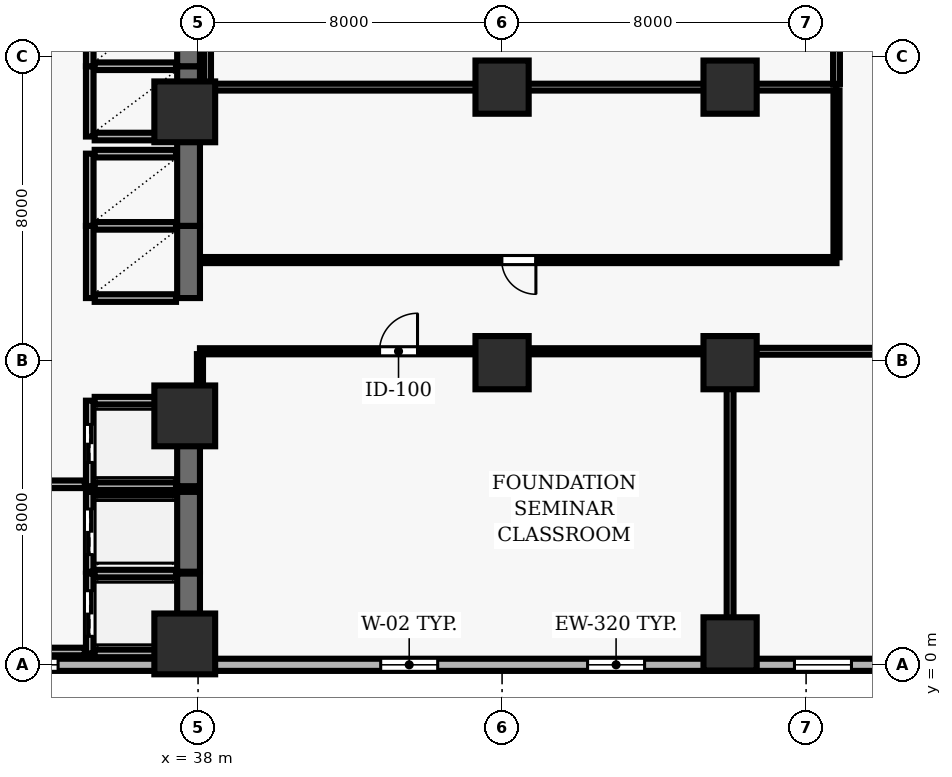
"""IFC4 building model, lengths in metres.
Left out: names, types, materials, properties, quantities, classifications, styles, units other than length and angle.
Written with IfcOpenShell. Run it as: python <this file> out.ifc"""

import sys

from ifc_helpers import new_model, si_unit, direction, frame, frame_2d, origin, origin_2d, place, context, subcontext, project, spatial, rectangle, extrude, element, fill, save


model = new_model("IFC4")
c1 = context("Model", 3, precision=1e-05, world=origin(), true_north=direction((0.0, 1.0)))
c2 = subcontext(c1, "Body", "Model", "MODEL_VIEW")
j1 = project(units=[si_unit("LENGTHUNIT", "METRE"), si_unit("PLANEANGLEUNIT", "RADIAN")], contexts=[c1])
p1 = place(None, origin())
s1 = spatial("IfcSite", under=j1, at=p1, CompositionType="ELEMENT")
p2 = place(p1, origin())
s2 = spatial("IfcBuilding", under=s1, at=p2, CompositionType="ELEMENT")
p3 = place(p2, frame((0.0, 0.0, 5.2)))
s3 = spatial("IfcBuildingStorey", under=s2, at=p3, CompositionType="ELEMENT", Elevation=5.2)
for number, where, z_axis, x_axis in (
    (1, (37.65, 0.55, 0.0), (0.0, 0.0, 1.0), (1.0, 0.0, 0.0)),
    (2, (37.65, 6.55, 0.0), (0.0, 0.0, 1.0), (1.0, 0.0, 0.0)),
    (3, (37.65, 14.55, 0.0), (0.0, 0.0, 1.0), (1.0, 0.0, 0.0)),
):
    element("IfcColumn", number, at=place(p3, frame(where, z_axis=z_axis, x_axis=x_axis)), inside=s3, PredefinedType="COLUMN", context=c2, shape_type="SweptSolid", body=[
        extrude(rectangle(XDim=1.6, YDim=1.6, at=origin_2d()), origin(), (0.0, 0.0, 1.0), 5.2),
    ])
for number, where, z_axis, x_axis in (
    (4, (46.0, 7.95, 0.0), (0.0, 0.0, 1.0), (1.0, 0.0, 0.0)),
    (5, (46.0, 15.2, 0.0), (0.0, 0.0, 1.0), (1.0, 0.0, 0.0)),
    (6, (52.0, 0.55, 0.0), (0.0, 0.0, 1.0), (1.0, 0.0, 0.0)),
    (7, (52.0, 7.95, 0.0), (0.0, 0.0, 1.0), (1.0, 0.0, 0.0)),
    (8, (52.0, 15.2, 0.0), (0.0, 0.0, 1.0), (1.0, 0.0, 0.0)),
):
    element("IfcColumn", number, at=place(p3, frame(where, z_axis=z_axis, x_axis=x_axis)), inside=s3, PredefinedType="COLUMN", context=c2, shape_type="SweptSolid", body=[
        extrude(rectangle(XDim=1.4, YDim=1.4, at=origin_2d()), origin(), (0.0, 0.0, 1.0), 5.2),
    ])
p4 = place(p3, frame((24.5, 0.0, 0.0), z_axis=(0.0, 0.0, 1.0), x_axis=(1.0, 0.0, 0.0)))
e9 = element("IfcWall", 9, at=p4, inside=s3, PredefinedType="SOLIDWALL", context=c2, shape_type="SweptSolid", body=[
    extrude(rectangle(XDim=49.0, YDim=0.32, at=frame_2d((24.5, 0.0))), origin(), (0.0, 0.0, 1.0), 4.92),
])
p5 = place(p4, frame((1.972, 0.0, 0.9)))
e10 = element("IfcOpeningElement", 10, at=p5, cuts=e9, PredefinedType="OPENING", context=c2, shape_type="SweptSolid", body=[
    extrude(rectangle(XDim=1.5, YDim=1.6, at=frame_2d((0.75, 0.8))), frame((0.0, 0.17, 0.0), z_axis=(0.0, -1.0, 0.0), x_axis=(1.0, 0.0, 0.0)), (0.0, 0.0, 1.0), 0.34),
])
p6 = place(p4, frame((8.317, 0.0, 0.9)))
e11 = element("IfcOpeningElement", 11, at=p6, cuts=e9, PredefinedType="OPENING", context=c2, shape_type="SweptSolid", body=[
    extrude(rectangle(XDim=1.5, YDim=1.6, at=frame_2d((0.75, 0.8))), frame((0.0, 0.17, 0.0), z_axis=(0.0, -1.0, 0.0), x_axis=(1.0, 0.0, 0.0)), (0.0, 0.0, 1.0), 0.34),
])
p7 = place(p4, frame((18.306, 0.0, 0.9)))
e12 = element("IfcOpeningElement", 12, at=p7, cuts=e9, PredefinedType="OPENING", context=c2, shape_type="SweptSolid", body=[
    extrude(rectangle(XDim=1.5, YDim=1.6, at=frame_2d((0.75, 0.8))), frame((0.0, 0.17, 0.0), z_axis=(0.0, -1.0, 0.0), x_axis=(1.0, 0.0, 0.0)), (0.0, 0.0, 1.0), 0.34),
])
p8 = place(p4, frame((23.75, 0.0, 0.9)))
e13 = element("IfcOpeningElement", 13, at=p8, cuts=e9, PredefinedType="OPENING", context=c2, shape_type="SweptSolid", body=[
    extrude(rectangle(XDim=1.5, YDim=1.6, at=frame_2d((0.75, 0.8))), frame((0.0, 0.17, 0.0), z_axis=(0.0, -1.0, 0.0), x_axis=(1.0, 0.0, 0.0)), (0.0, 0.0, 1.0), 0.34),
])
p9 = place(p4, frame((29.194, 0.0, 0.9)))
e14 = element("IfcOpeningElement", 14, at=p9, cuts=e9, PredefinedType="OPENING", context=c2, shape_type="SweptSolid", body=[
    extrude(rectangle(XDim=1.5, YDim=1.6, at=frame_2d((0.75, 0.8))), frame((0.0, 0.17, 0.0), z_axis=(0.0, -1.0, 0.0), x_axis=(1.0, 0.0, 0.0)), (0.0, 0.0, 1.0), 0.34),
])
p10 = place(p4, frame((34.639, 0.0, 0.9)))
e15 = element("IfcOpeningElement", 15, at=p10, cuts=e9, PredefinedType="OPENING", context=c2, shape_type="SweptSolid", body=[
    extrude(rectangle(XDim=1.5, YDim=1.6, at=frame_2d((0.75, 0.8))), frame((0.0, 0.17, 0.0), z_axis=(0.0, -1.0, 0.0), x_axis=(1.0, 0.0, 0.0)), (0.0, 0.0, 1.0), 0.34),
])
p11 = place(p4, frame((40.083, 0.0, 0.9)))
e16 = element("IfcOpeningElement", 16, at=p11, cuts=e9, PredefinedType="OPENING", context=c2, shape_type="SweptSolid", body=[
    extrude(rectangle(XDim=1.5, YDim=1.6, at=frame_2d((0.75, 0.8))), frame((0.0, 0.17, 0.0), z_axis=(0.0, -1.0, 0.0), x_axis=(1.0, 0.0, 0.0)), (0.0, 0.0, 1.0), 0.34),
])
p12 = place(p4, frame((45.528, 0.0, 0.9)))
e17 = element("IfcOpeningElement", 17, at=p12, cuts=e9, PredefinedType="OPENING", context=c2, shape_type="SweptSolid", body=[
    extrude(rectangle(XDim=1.5, YDim=1.6, at=frame_2d((0.75, 0.8))), frame((0.0, 0.17, 0.0), z_axis=(0.0, -1.0, 0.0), x_axis=(1.0, 0.0, 0.0)), (0.0, 0.0, 1.0), 0.34),
])
p13 = place(p3, frame((35.15, 2.4, 0.0), z_axis=(0.0, 0.0, 1.0), x_axis=(0.0, -1.0, 0.0)))
e18 = element("IfcWall", 18, at=p13, inside=s3, PredefinedType="SOLIDWALL", context=c2, shape_type="SweptSolid", body=[
    extrude(rectangle(XDim=2.1, YDim=0.2, at=frame_2d((1.05, 0.0))), origin(), (0.0, 0.0, 1.0), 4.92),
])
p14 = place(p13, frame((0.45, 0.0, 0.0)))
e19 = element("IfcOpeningElement", 19, at=p14, cuts=e18, PredefinedType="OPENING", context=c2, shape_type="SweptSolid", body=[
    extrude(rectangle(XDim=1.2, YDim=2.15, at=frame_2d((0.6, 1.075))), frame((0.0, 0.11, 0.0), z_axis=(0.0, -1.0, 0.0), x_axis=(1.0, 0.0, 0.0)), (0.0, 0.0, 1.0), 0.22),
])
p15 = place(p3, frame((37.75, 0.3, 0.0), z_axis=(0.0, 0.0, 1.0), x_axis=(0.0, 1.0, 0.0)))
e20 = element("IfcWall", 20, at=p15, inside=s3, PredefinedType="SHEAR", context=c2, shape_type="SweptSolid", body=[
    extrude(rectangle(XDim=2.1, YDim=0.6, at=frame_2d((1.05, 0.0))), origin(), (0.0, 0.0, 1.0), 4.92),
])
for number, where, z_axis, x_axis in (
    (21, (35.28, 0.3, 0.0), (0.0, 0.0, 1.0), (1.0, 0.0, 0.0)),
    (22, (37.42, 2.4, 0.0), (0.0, 0.0, 1.0), (-1.0, 0.0, 0.0)),
):
    element("IfcWall", number, at=place(p3, frame(where, z_axis=z_axis, x_axis=x_axis)), inside=s3, PredefinedType="SOLIDWALL", context=c2, shape_type="SweptSolid", body=[
        extrude(rectangle(XDim=2.14, YDim=0.2, at=frame_2d((1.07, 0.0))), origin(), (0.0, 0.0, 1.0), 4.92),
    ])
p16 = place(p3, frame((35.15, 4.55, 0.0), z_axis=(0.0, 0.0, 1.0), x_axis=(0.0, -1.0, 0.0)))
e23 = element("IfcWall", 23, at=p16, inside=s3, PredefinedType="SOLIDWALL", context=c2, shape_type="SweptSolid", body=[
    extrude(rectangle(XDim=2.1, YDim=0.2, at=frame_2d((1.05, 0.0))), origin(), (0.0, 0.0, 1.0), 4.92),
])
p17 = place(p16, frame((0.45, 0.0, 0.0)))
e24 = element("IfcOpeningElement", 24, at=p17, cuts=e23, PredefinedType="OPENING", context=c2, shape_type="SweptSolid", body=[
    extrude(rectangle(XDim=1.2, YDim=2.15, at=frame_2d((0.6, 1.075))), frame((0.0, 0.11, 0.0), z_axis=(0.0, -1.0, 0.0), x_axis=(1.0, 0.0, 0.0)), (0.0, 0.0, 1.0), 0.22),
])
p18 = place(p3, frame((37.75, 2.45, 0.0), z_axis=(0.0, 0.0, 1.0), x_axis=(0.0, 1.0, 0.0)))
e25 = element("IfcWall", 25, at=p18, inside=s3, PredefinedType="SHEAR", context=c2, shape_type="SweptSolid", body=[
    extrude(rectangle(XDim=2.1, YDim=0.6, at=frame_2d((1.05, 0.0))), origin(), (0.0, 0.0, 1.0), 4.92),
])
p19 = place(p3, frame((37.42, 4.55, 0.0), z_axis=(0.0, 0.0, 1.0), x_axis=(-1.0, 0.0, 0.0)))
e26 = element("IfcWall", 26, at=p19, inside=s3, PredefinedType="SOLIDWALL", context=c2, shape_type="SweptSolid", body=[
    extrude(rectangle(XDim=2.14, YDim=0.2, at=frame_2d((1.07, 0.0))), origin(), (0.0, 0.0, 1.0), 4.92),
])
p20 = place(p3, frame((35.15, 6.95, 0.0), z_axis=(0.0, 0.0, 1.0), x_axis=(0.0, -1.0, 0.0)))
e27 = element("IfcWall", 27, at=p20, inside=s3, PredefinedType="SOLIDWALL", context=c2, shape_type="SweptSolid", body=[
    extrude(rectangle(XDim=2.25, YDim=0.2, at=frame_2d((1.125, 0.0))), origin(), (0.0, 0.0, 1.0), 4.92),
])
p21 = place(p20, frame((0.625, 0.0, 0.0)))
e28 = element("IfcOpeningElement", 28, at=p21, cuts=e27, PredefinedType="OPENING", context=c2, shape_type="SweptSolid", body=[
    extrude(rectangle(XDim=1.0, YDim=2.1, at=frame_2d((0.5, 1.05))), frame((0.0, 0.11, 0.0), z_axis=(0.0, -1.0, 0.0), x_axis=(1.0, 0.0, 0.0)), (0.0, 0.0, 1.0), 0.22),
])
p22 = place(p3, frame((37.75, 4.7, 0.0), z_axis=(0.0, 0.0, 1.0), x_axis=(0.0, 1.0, 0.0)))
e29 = element("IfcWall", 29, at=p22, inside=s3, PredefinedType="SHEAR", context=c2, shape_type="SweptSolid", body=[
    extrude(rectangle(XDim=2.25, YDim=0.6, at=frame_2d((1.125, 0.0))), origin(), (0.0, 0.0, 1.0), 4.92),
])
for number, where, z_axis, x_axis in (
    (30, (35.28, 4.7, 0.0), (0.0, 0.0, 1.0), (1.0, 0.0, 0.0)),
    (31, (37.42, 6.95, 0.0), (0.0, 0.0, 1.0), (-1.0, 0.0, 0.0)),
):
    element("IfcWall", number, at=place(p3, frame(where, z_axis=z_axis, x_axis=x_axis)), inside=s3, PredefinedType="SOLIDWALL", context=c2, shape_type="SweptSolid", body=[
        extrude(rectangle(XDim=2.14, YDim=0.2, at=frame_2d((1.07, 0.0))), origin(), (0.0, 0.0, 1.0), 4.92),
    ])
p23 = place(p3, frame((35.15, 11.55, 0.0), z_axis=(0.0, 0.0, 1.0), x_axis=(0.0, -1.0, 0.0)))
e32 = element("IfcWall", 32, at=p23, inside=s3, PredefinedType="SOLIDWALL", context=c2, shape_type="SweptSolid", body=[
    extrude(rectangle(XDim=1.9, YDim=0.2, at=frame_2d((0.95, 0.0))), origin(), (0.0, 0.0, 1.0), 4.92),
])
p24 = place(p3, frame((37.75, 9.65, 0.0), z_axis=(0.0, 0.0, 1.0), x_axis=(0.0, 1.0, 0.0)))
e33 = element("IfcWall", 33, at=p24, inside=s3, PredefinedType="SHEAR", context=c2, shape_type="SweptSolid", body=[
    extrude(rectangle(XDim=1.9, YDim=0.6, at=frame_2d((0.95, 0.0))), origin(), (0.0, 0.0, 1.0), 4.92),
])
for number, where, z_axis, x_axis in (
    (34, (35.28, 9.65, 0.0), (0.0, 0.0, 1.0), (1.0, 0.0, 0.0)),
    (35, (37.42, 11.55, 0.0), (0.0, 0.0, 1.0), (-1.0, 0.0, 0.0)),
):
    element("IfcWall", number, at=place(p3, frame(where, z_axis=z_axis, x_axis=x_axis)), inside=s3, PredefinedType="SOLIDWALL", context=c2, shape_type="SweptSolid", body=[
        extrude(rectangle(XDim=2.14, YDim=0.2, at=frame_2d((1.07, 0.0))), origin(), (0.0, 0.0, 1.0), 4.92),
    ])
p25 = place(p3, frame((35.15, 13.45, 0.0), z_axis=(0.0, 0.0, 1.0), x_axis=(0.0, -1.0, 0.0)))
e36 = element("IfcWall", 36, at=p25, inside=s3, PredefinedType="SOLIDWALL", context=c2, shape_type="SweptSolid", body=[
    extrude(rectangle(XDim=1.9, YDim=0.2, at=frame_2d((0.95, 0.0))), origin(), (0.0, 0.0, 1.0), 4.92),
])
p26 = place(p3, frame((37.75, 11.55, 0.0), z_axis=(0.0, 0.0, 1.0), x_axis=(0.0, 1.0, 0.0)))
e37 = element("IfcWall", 37, at=p26, inside=s3, PredefinedType="SHEAR", context=c2, shape_type="SweptSolid", body=[
    extrude(rectangle(XDim=2.35, YDim=0.6, at=frame_2d((1.175, 0.0))), origin(), (0.0, 0.0, 1.0), 4.92),
])
p27 = place(p3, frame((37.42, 13.45, 0.0), z_axis=(0.0, 0.0, 1.0), x_axis=(-1.0, 0.0, 0.0)))
e38 = element("IfcWall", 38, at=p27, inside=s3, PredefinedType="SOLIDWALL", context=c2, shape_type="SweptSolid", body=[
    extrude(rectangle(XDim=2.14, YDim=0.2, at=frame_2d((1.07, 0.0))), origin(), (0.0, 0.0, 1.0), 4.92),
])
p28 = place(p3, frame((35.15, 15.75, 0.0), z_axis=(0.0, 0.0, 1.0), x_axis=(0.0, -1.0, 0.0)))
e39 = element("IfcWall", 39, at=p28, inside=s3, PredefinedType="SOLIDWALL", context=c2, shape_type="SweptSolid", body=[
    extrude(rectangle(XDim=1.85, YDim=0.2, at=frame_2d((0.925, 0.0))), origin(), (0.0, 0.0, 1.0), 4.92),
])
p29 = place(p3, frame((37.75, 13.9, 0.0), z_axis=(0.0, 0.0, 1.0), x_axis=(0.0, 1.0, 0.0)))
e40 = element("IfcWall", 40, at=p29, inside=s3, PredefinedType="SHEAR", context=c2, shape_type="SweptSolid", body=[
    extrude(rectangle(XDim=1.85, YDim=0.6, at=frame_2d((0.925, 0.0))), origin(), (0.0, 0.0, 1.0), 4.92),
])
for number, where, z_axis, x_axis in (
    (41, (35.28, 13.9, 0.0), (0.0, 0.0, 1.0), (1.0, 0.0, 0.0)),
    (42, (37.42, 15.75, 0.0), (0.0, 0.0, 1.0), (-1.0, 0.0, 0.0)),
):
    element("IfcWall", number, at=place(p3, frame(where, z_axis=z_axis, x_axis=x_axis)), inside=s3, PredefinedType="SOLIDWALL", context=c2, shape_type="SweptSolid", body=[
        extrude(rectangle(XDim=2.14, YDim=0.2, at=frame_2d((1.07, 0.0))), origin(), (0.0, 0.0, 1.0), 4.92),
    ])
p30 = place(p3, frame((35.15, 17.6, 0.0), z_axis=(0.0, 0.0, 1.0), x_axis=(0.0, -1.0, 0.0)))
e43 = element("IfcWall", 43, at=p30, inside=s3, PredefinedType="SOLIDWALL", context=c2, shape_type="SweptSolid", body=[
    extrude(rectangle(XDim=1.85, YDim=0.2, at=frame_2d((0.925, 0.0))), origin(), (0.0, 0.0, 1.0), 4.92),
])
p31 = place(p3, frame((37.75, 15.75, 0.0), z_axis=(0.0, 0.0, 1.0), x_axis=(0.0, 1.0, 0.0)))
e44 = element("IfcWall", 44, at=p31, inside=s3, PredefinedType="SHEAR", context=c2, shape_type="SweptSolid", body=[
    extrude(rectangle(XDim=1.85, YDim=0.6, at=frame_2d((0.925, 0.0))), origin(), (0.0, 0.0, 1.0), 4.92),
])
p32 = place(p3, frame((31.65, 0.35, 0.0), z_axis=(0.0, 0.0, 1.0), x_axis=(1.0, 0.0, 0.0)))
e45 = element("IfcWall", 45, at=p32, inside=s3, PredefinedType="SOLIDWALL", context=c2, shape_type="SweptSolid", body=[
    extrude(rectangle(XDim=3.37, YDim=0.2, at=frame_2d((1.685, 0.0))), origin(), (0.0, 0.0, 1.0), 4.92),
])
p33 = place(p3, frame((35.02, 4.75, 0.0), z_axis=(0.0, 0.0, 1.0), x_axis=(-1.0, 0.0, 0.0)))
e46 = element("IfcWall", 46, at=p33, inside=s3, PredefinedType="SOLIDWALL", context=c2, shape_type="SweptSolid", body=[
    extrude(rectangle(XDim=3.11, YDim=0.2, at=frame_2d((1.555, 0.0))), origin(), (0.0, 0.0, 1.0), 4.92),
])
p34 = place(p33, frame((1.03, 0.0, 0.0)))
e47 = element("IfcOpeningElement", 47, at=p34, cuts=e46, PredefinedType="OPENING", context=c2, shape_type="SweptSolid", body=[
    extrude(rectangle(XDim=1.05, YDim=2.15, at=frame_2d((0.525, 1.075))), frame((0.0, 0.11, 0.0), z_axis=(0.0, -1.0, 0.0), x_axis=(1.0, 0.0, 0.0)), (0.0, 0.0, 1.0), 0.22),
])
p35 = place(p3, frame((38.05, 8.25, 0.0), z_axis=(0.0, 0.0, 1.0), x_axis=(1.0, 0.0, 0.0)))
e48 = element("IfcWall", 48, at=p35, inside=s3, PredefinedType="PARTITIONING", context=c2, shape_type="SweptSolid", body=[
    extrude(rectangle(XDim=13.95, YDim=0.16, at=frame_2d((6.975, 0.0))), origin(), (0.0, 0.0, 1.0), 4.065),
])
p36 = place(p35, frame((4.725, 0.0, 0.0)))
e49 = element("IfcOpeningElement", 49, at=p36, cuts=e48, PredefinedType="OPENING", context=c2, shape_type="SweptSolid", body=[
    extrude(rectangle(XDim=1.0, YDim=2.1, at=frame_2d((0.5, 1.05))), frame((0.0, 0.09, 0.0), z_axis=(0.0, -1.0, 0.0), x_axis=(1.0, 0.0, 0.0)), (0.0, 0.0, 1.0), 0.18),
])
p37 = place(p3, frame((38.25, 15.2, 0.0), z_axis=(0.0, 0.0, 1.0), x_axis=(1.0, 0.0, 0.0)))
e50 = element("IfcWall", 50, at=p37, inside=s3, PredefinedType="PARTITIONING", context=c2, shape_type="SweptSolid", body=[
    extrude(rectangle(XDim=16.55, YDim=0.18, at=frame_2d((8.275, 0.0))), origin(), (0.0, 0.0, 1.0), 4.065),
])
p38 = place(p3, frame((52.0, 8.25, 0.0), z_axis=(0.0, 0.0, 1.0), x_axis=(1.0, 0.0, 0.0)))
e51 = element("IfcWall", 51, at=p38, inside=s3, PredefinedType="PARTITIONING", context=c2, shape_type="SweptSolid", body=[
    extrude(rectangle(XDim=23.92, YDim=0.18, at=frame_2d((11.96, 0.0))), origin(), (0.0, 0.0, 1.0), 4.065),
])
p39 = place(p38, frame((11.485, 0.0, 0.0)))
e52 = element("IfcOpeningElement", 52, at=p39, cuts=e51, PredefinedType="OPENING", context=c2, shape_type="SweptSolid", body=[
    extrude(rectangle(XDim=0.95, YDim=2.1, at=frame_2d((0.475, 1.05))), frame((0.0, 0.1, 0.0), z_axis=(0.0, -1.0, 0.0), x_axis=(1.0, 0.0, 0.0)), (0.0, 0.0, 1.0), 0.2),
])
p40 = place(p3, frame((54.8, 10.65, 0.0), z_axis=(0.0, 0.0, 1.0), x_axis=(-1.0, 0.0, 0.0)))
e53 = element("IfcWall", 53, at=p40, inside=s3, PredefinedType="PARTITIONING", context=c2, shape_type="SweptSolid", body=[
    extrude(rectangle(XDim=16.72, YDim=0.16, at=frame_2d((8.36, 0.0))), origin(), (0.0, 0.0, 1.0), 4.451),
])
p41 = place(p40, frame((7.91, 0.0, 0.0)))
e54 = element("IfcOpeningElement", 54, at=p41, cuts=e53, PredefinedType="OPENING", context=c2, shape_type="SweptSolid", body=[
    extrude(rectangle(XDim=0.9, YDim=2.1, at=frame_2d((0.45, 1.05))), frame((0.0, 0.09, 0.0), z_axis=(0.0, -1.0, 0.0), x_axis=(1.0, 0.0, 0.0)), (0.0, 0.0, 1.0), 0.18),
])
p42 = place(p3, frame((38.05, 7.05, 0.0), z_axis=(0.0, 0.0, 1.0), x_axis=(0.0, 1.0, 0.0)))
e55 = element("IfcWall", 55, at=p42, inside=s3, PredefinedType="PARTITIONING", context=c2, shape_type="SweptSolid", body=[
    extrude(rectangle(XDim=1.125, YDim=0.16, at=frame_2d((0.562, 0.0))), origin(), (0.0, 0.0, 1.0), 4.065),
])
p43 = place(p3, frame((38.25, 25.925, 0.0), z_axis=(0.0, 0.0, 1.0), x_axis=(0.0, -1.0, 0.0)))
e56 = element("IfcWall", 56, at=p43, inside=s3, PredefinedType="PARTITIONING", context=c2, shape_type="SweptSolid", body=[
    extrude(rectangle(XDim=10.64, YDim=0.18, at=frame_2d((5.32, 0.0))), origin(), (0.0, 0.0, 1.0), 4.92),
])
p44 = place(p3, frame((52.0, 0.155, 0.0), z_axis=(0.0, 0.0, 1.0), x_axis=(0.0, 1.0, 0.0)))
e57 = element("IfcWall", 57, at=p44, inside=s3, PredefinedType="PARTITIONING", context=c2, shape_type="SweptSolid", body=[
    extrude(rectangle(XDim=8.01, YDim=0.18, at=frame_2d((4.005, 0.0))), origin(), (0.0, 0.0, 1.0), 4.065),
])
p45 = place(p3, frame((54.8, 15.115, 0.0), z_axis=(0.0, 0.0, 1.0), x_axis=(0.0, -1.0, 0.0)))
e58 = element("IfcWall", 58, at=p45, inside=s3, PredefinedType="PARTITIONING", context=c2, shape_type="SweptSolid", body=[
    extrude(rectangle(XDim=4.39, YDim=0.16, at=frame_2d((2.195, 0.0))), origin(), (0.0, 0.0, 1.0), 4.92),
])
p46 = place(p3, frame((54.8, 27.925, 0.0), z_axis=(0.0, 0.0, 1.0), x_axis=(0.0, -1.0, 0.0)))
e59 = element("IfcWall", 59, at=p46, inside=s3, PredefinedType="PARTITIONING", context=c2, shape_type="SweptSolid", body=[
    extrude(rectangle(XDim=12.64, YDim=0.18, at=frame_2d((6.32, 0.0))), origin(), (0.0, 0.0, 1.0), 4.451),
])
p47 = place(p46, frame((5.57, 0.0, 0.0)))
e60 = element("IfcOpeningElement", 60, at=p47, cuts=e59, PredefinedType="OPENING", context=c2, shape_type="SweptSolid", body=[
    extrude(rectangle(XDim=1.5, YDim=2.2, at=frame_2d((0.75, 1.1))), frame((0.0, 0.1, 0.0), z_axis=(0.0, -1.0, 0.0), x_axis=(1.0, 0.0, 0.0)), (0.0, 0.0, 1.0), 0.2),
])
p48 = place(p6, origin())
e61 = element("IfcWindow", 61, at=p48, inside=s3, PartitioningType="SINGLE_PANEL", PredefinedType="WINDOW", context=c2, shape_type="SweptSolid", body=[
    extrude(rectangle(XDim=1.5, YDim=1.6, at=frame_2d((0.75, 0.8))), frame((0.0, 0.03, 0.0), z_axis=(0.0, -1.0, 0.0), x_axis=(1.0, 0.0, 0.0)), (0.0, 0.0, 1.0), 0.06),
])
fill(e11, e61)
p49 = place(p7, origin())
e62 = element("IfcWindow", 62, at=p49, inside=s3, PartitioningType="SINGLE_PANEL", PredefinedType="WINDOW", context=c2, shape_type="SweptSolid", body=[
    extrude(rectangle(XDim=1.5, YDim=1.6, at=frame_2d((0.75, 0.8))), frame((0.0, 0.03, 0.0), z_axis=(0.0, -1.0, 0.0), x_axis=(1.0, 0.0, 0.0)), (0.0, 0.0, 1.0), 0.06),
])
fill(e12, e62)
p50 = place(p8, origin())
e63 = element("IfcWindow", 63, at=p50, inside=s3, PartitioningType="SINGLE_PANEL", PredefinedType="WINDOW", context=c2, shape_type="SweptSolid", body=[
    extrude(rectangle(XDim=1.5, YDim=1.6, at=frame_2d((0.75, 0.8))), frame((0.0, 0.03, 0.0), z_axis=(0.0, -1.0, 0.0), x_axis=(1.0, 0.0, 0.0)), (0.0, 0.0, 1.0), 0.06),
])
fill(e13, e63)
p51 = place(p9, origin())
e64 = element("IfcWindow", 64, at=p51, inside=s3, PartitioningType="SINGLE_PANEL", PredefinedType="WINDOW", context=c2, shape_type="SweptSolid", body=[
    extrude(rectangle(XDim=1.5, YDim=1.6, at=frame_2d((0.75, 0.8))), frame((0.0, 0.03, 0.0), z_axis=(0.0, -1.0, 0.0), x_axis=(1.0, 0.0, 0.0)), (0.0, 0.0, 1.0), 0.06),
])
fill(e14, e64)
p52 = place(p14, origin())
e65 = element("IfcDoor", 65, at=p52, inside=s3, OperationType="DOUBLE_DOOR_SLIDING", PredefinedType="DOOR", context=c2, shape_type="SweptSolid", body=[
    extrude(rectangle(XDim=1.2, YDim=2.15, at=frame_2d((0.6, 1.075))), frame((0.0, 0.025, 0.0), z_axis=(0.0, -1.0, 0.0), x_axis=(1.0, 0.0, 0.0)), (0.0, 0.0, 1.0), 0.05),
])
fill(e19, e65)
p53 = place(p17, origin())
e66 = element("IfcDoor", 66, at=p53, inside=s3, OperationType="DOUBLE_DOOR_SLIDING", PredefinedType="DOOR", context=c2, shape_type="SweptSolid", body=[
    extrude(rectangle(XDim=1.2, YDim=2.15, at=frame_2d((0.6, 1.075))), frame((0.0, 0.025, 0.0), z_axis=(0.0, -1.0, 0.0), x_axis=(1.0, 0.0, 0.0)), (0.0, 0.0, 1.0), 0.05),
])
fill(e24, e66)
p54 = place(p21, origin())
e67 = element("IfcDoor", 67, at=p54, inside=s3, OperationType="DOUBLE_DOOR_SLIDING", PredefinedType="DOOR", context=c2, shape_type="SweptSolid", body=[
    extrude(rectangle(XDim=1.0, YDim=2.1, at=frame_2d((0.5, 1.05))), frame((0.0, 0.025, 0.0), z_axis=(0.0, -1.0, 0.0), x_axis=(1.0, 0.0, 0.0)), (0.0, 0.0, 1.0), 0.05),
])
fill(e28, e67)
p55 = place(p41, origin())
e68 = element("IfcDoor", 68, at=p55, inside=s3, OperationType="SINGLE_SWING_LEFT", PredefinedType="DOOR", context=c2, shape_type="SweptSolid", body=[
    extrude(rectangle(XDim=0.9, YDim=2.1, at=frame_2d((0.45, 1.05))), frame((0.0, 0.025, 0.0), z_axis=(0.0, -1.0, 0.0), x_axis=(1.0, 0.0, 0.0)), (0.0, 0.0, 1.0), 0.05),
])
fill(e54, e68)
p56 = place(p36, origin())
e69 = element("IfcDoor", 69, at=p56, inside=s3, OperationType="SINGLE_SWING_RIGHT", PredefinedType="DOOR", context=c2, shape_type="SweptSolid", body=[
    extrude(rectangle(XDim=1.0, YDim=2.1, at=frame_2d((0.5, 1.05))), frame((0.0, 0.025, 0.0), z_axis=(0.0, -1.0, 0.0), x_axis=(1.0, 0.0, 0.0)), (0.0, 0.0, 1.0), 0.05),
])
fill(e49, e69)
save(model, sys.argv[1])
